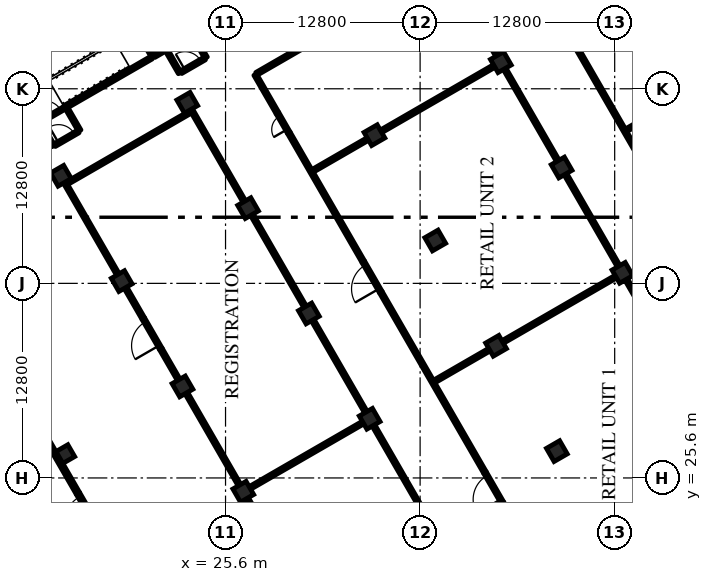
"""IFC4 building model, lengths in metres.
Left out: names, types, materials, properties, quantities, classifications, styles, units other than length and angle.
Written with IfcOpenShell. Run it as: python <this file> out.ifc"""

import sys

from ifc_helpers import new_model, si_unit, direction, frame, frame_2d, origin, origin_2d, place, context, subcontext, project, spatial, rectangle, extrude, element, fill, save


model = new_model("IFC4")
c1 = context("Model", 3, precision=1e-05, world=origin(), true_north=direction((0.0, 1.0)))
c2 = subcontext(c1, "Body", "Model", "MODEL_VIEW")
j1 = project(units=[si_unit("LENGTHUNIT", "METRE"), si_unit("PLANEANGLEUNIT", "RADIAN")], contexts=[c1])
p1 = place(None, origin())
s1 = spatial("IfcSite", under=j1, at=p1, CompositionType="ELEMENT")
p2 = place(p1, origin())
s2 = spatial("IfcBuilding", under=s1, at=p2, CompositionType="ELEMENT")
p3 = place(p2, origin())
s3 = spatial("IfcBuildingStorey", under=s2, at=p3, CompositionType="ELEMENT", Elevation=0.0)
for number, where, z_axis, x_axis in (
    (1, (47.396, 27.364, -0.3), (0.0, 0.0, 1.0), (-0.5, 0.866, 0.0)),
    (2, (26.768, 24.692, -0.3), (0.0, 0.0, 1.0), (-0.5, 0.866, 0.0)),
    (3, (35.082, 29.492, -0.3), (0.0, 0.0, 1.0), (-0.5, 0.866, 0.0)),
    (4, (43.396, 34.292, -0.3), (0.0, 0.0, 1.0), (-0.5, 0.866, 0.0)),
    (5, (51.71, 39.092, -0.3), (0.0, 0.0, 1.0), (-0.5, 0.866, 0.0)),
):
    element("IfcColumn", number, at=place(p3, frame(where, z_axis=z_axis, x_axis=x_axis)), inside=s3, PredefinedType="COLUMN", context=c2, shape_type="SweptSolid", body=[
        extrude(rectangle(XDim=1.0, YDim=1.0, at=origin_2d()), origin(), (0.0, 0.0, 1.0), 6.3),
    ])
p4 = place(p3, frame((15.061, 27.17, -0.3), z_axis=(0.0, 0.0, 1.0), x_axis=(-0.5, 0.866025403784, 0.0)))
e6 = element("IfcColumn", 6, at=p4, inside=s3, PredefinedType="COLUMN", context=c2, shape_type="SweptSolid", body=[
    extrude(rectangle(XDim=0.9, YDim=0.9, at=origin_2d()), origin(), (0.0, 0.0, 1.0), 6.3),
])
for number, where, z_axis, x_axis in (
    (7, (22.768, 31.62, -0.3), (0.0, 0.0, 1.0), (-0.5, 0.866, 0.0)),
    (8, (31.082, 36.42, -0.3), (0.0, 0.0, 1.0), (-0.5, 0.866, 0.0)),
    (9, (39.396, 41.22, -0.3), (0.0, 0.0, 1.0), (-0.5, 0.866, 0.0)),
    (10, (47.71, 46.021, -0.3), (0.0, 0.0, 1.0), (-0.5, 0.866, 0.0)),
    (11, (18.768, 38.549, -0.3), (0.0, 0.0, 1.0), (-0.5, 0.866, 0.0)),
    (12, (27.082, 43.349, -0.3), (0.0, 0.0, 1.0), (-0.5, 0.866, 0.0)),
    (13, (35.396, 48.149, -0.3), (0.0, 0.0, 1.0), (-0.5, 0.866, 0.0)),
    (14, (43.71, 52.948, -0.3), (0.0, 0.0, 1.0), (-0.5, 0.866, 0.0)),
    (15, (14.768, 45.477, -0.3), (0.0, 0.0, 1.0), (-0.5, 0.866, 0.0)),
    (16, (23.082, 50.277, -0.3), (0.0, 0.0, 1.0), (-0.5, 0.866, 0.0)),
):
    element("IfcColumn", number, at=place(p3, frame(where, z_axis=z_axis, x_axis=x_axis)), inside=s3, PredefinedType="COLUMN", context=c2, shape_type="SweptSolid", body=[
        extrude(rectangle(XDim=1.0, YDim=1.0, at=origin_2d()), origin(), (0.0, 0.0, 1.0), 6.3),
    ])
p5 = place(p3, frame((17.238, 22.25, 0.0), z_axis=(0.0, 0.0, 1.0), x_axis=(-0.499980770555, 0.866036505625, 0.0)))
e17 = element("IfcWall", 17, at=p5, inside=s3, PredefinedType="SOLIDWALL", context=c2, shape_type="SweptSolid", body=[
    extrude(rectangle(XDim=2.7, YDim=0.25, at=frame_2d((1.35, 0.0))), origin(), (0.0, 0.0, 1.0), 5.7),
])
p6 = place(p5, frame((0.25, 0.0, 0.0)))
e18 = element("IfcOpeningElement", 18, at=p6, cuts=e17, PredefinedType="OPENING", context=c2, shape_type="SweptSolid", body=[
    extrude(rectangle(XDim=2.2, YDim=2.1, at=frame_2d((1.1, 1.05))), frame((0.0, 0.135, 0.0), z_axis=(0.0, -1.0, 0.0), x_axis=(1.0, 0.0, 0.0)), (0.0, 0.0, 1.0), 0.27),
])
p7 = place(p3, frame((15.888, 24.588, 0.0), z_axis=(0.0, 0.0, 1.0), x_axis=(-0.50002983664, 0.866008176907, 0.0)))
e19 = element("IfcWall", 19, at=p7, inside=s3, PredefinedType="SOLIDWALL", context=c2, shape_type="SweptSolid", body=[
    extrude(rectangle(XDim=4.4, YDim=0.25, at=frame_2d((2.2, 0.0))), origin(), (0.0, 0.0, 1.0), 5.7),
])
p8 = place(p3, frame((47.49, 65.351, 0.0), z_axis=(0.0, 0.0, 1.0), x_axis=(0.499999548647, -0.866025664373, 0.0)))
e20 = element("IfcWall", 20, at=p8, inside=s3, PredefinedType="SOLIDWALL", context=c2, shape_type="SweptSolid", body=[
    extrude(rectangle(XDim=34.6, YDim=0.25, at=frame_2d((17.3, 0.0))), origin(), (0.0, 0.0, 1.0), 5.7),
])
p9 = place(p3, frame((12.909, 53.497, 0.0), z_axis=(0.0, 0.0, 1.0), x_axis=(0.866026575979, 0.499997969693, 0.0)))
e21 = element("IfcWall", 21, at=p9, inside=s3, PredefinedType="SOLIDWALL", context=c2, shape_type="SweptSolid", body=[
    extrude(rectangle(XDim=6.75, YDim=0.25, at=frame_2d((3.375, 0.0))), origin(), (0.0, 0.0, 1.0), 5.7),
])
p10 = place(p3, frame((20.817, 53.299, 0.0), z_axis=(0.0, 0.0, 1.0), x_axis=(-0.49999285859, 0.86602952684, 0.0)))
e22 = element("IfcWall", 22, at=p10, inside=s3, PredefinedType="SOLIDWALL", context=c2, shape_type="SweptSolid", body=[
    extrude(rectangle(XDim=3.1, YDim=0.2, at=frame_2d((1.55, 0.0))), origin(), (0.0, 0.0, 1.0), 5.7),
])
p11 = place(p3, frame((13.456, 49.049, 0.0), z_axis=(0.0, 0.0, 1.0), x_axis=(0.866036909293, 0.499980071345, 0.0)))
e23 = element("IfcWall", 23, at=p11, inside=s3, PredefinedType="SOLIDWALL", context=c2, shape_type="SweptSolid", body=[
    extrude(rectangle(XDim=1.75, YDim=0.2, at=frame_2d((0.875, 0.0))), origin(), (0.0, 0.0, 1.0), 5.7),
])
p12 = place(p11, frame((0.3, 0.0, 0.0)))
e24 = element("IfcOpeningElement", 24, at=p12, cuts=e23, PredefinedType="OPENING", context=c2, shape_type="SweptSolid", body=[
    extrude(rectangle(XDim=1.2, YDim=2.1, at=frame_2d((0.6, 1.05))), frame((0.0, 0.11, 0.0), z_axis=(0.0, -1.0, 0.0), x_axis=(1.0, 0.0, 0.0)), (0.0, 0.0, 1.0), 0.22),
])
p13 = place(p3, frame((14.972, 49.924, 0.0), z_axis=(0.0, 0.0, 1.0), x_axis=(0.86601134256, 0.500024353964, 0.0)))
e25 = element("IfcWall", 25, at=p13, inside=s3, PredefinedType="SOLIDWALL", context=c2, shape_type="SweptSolid", body=[
    extrude(rectangle(XDim=6.65, YDim=0.2, at=frame_2d((3.325, 0.0))), origin(), (0.0, 0.0, 1.0), 5.7),
])
for number, where, z_axis, x_axis in (
    (26, (14.27, 47.441, 0.0), (0.0, 0.0, 1.0), (-0.5, 0.866, 0.0)),
    (27, (16.001, 48.441, 0.0), (0.0, 0.0, 1.0), (-0.5, 0.866, 0.0)),
    (28, (22.583, 52.24, 0.0), (0.0, 0.0, 1.0), (-0.5, 0.866, 0.0)),
):
    element("IfcWall", number, at=place(p3, frame(where, z_axis=z_axis, x_axis=x_axis)), inside=s3, PredefinedType="PARTITIONING", context=c2, shape_type="SweptSolid", body=[
        extrude(rectangle(XDim=1.7, YDim=0.2, at=frame_2d((0.85, 0.0))), origin(), (0.0, 0.0, 1.0), 5.1),
    ])
p14 = place(p3, frame((24.315, 53.24, 0.0), z_axis=(0.0, 0.0, 1.0), x_axis=(-0.500000056704, 0.866025371046, 0.0)))
e29 = element("IfcWall", 29, at=p14, inside=s3, PredefinedType="PARTITIONING", context=c2, shape_type="SweptSolid", body=[
    extrude(rectangle(XDim=1.7, YDim=0.2, at=frame_2d((0.85, 0.0))), origin(), (0.0, 0.0, 1.0), 5.1),
])
p15 = place(p3, frame((14.356, 47.49, 0.0), z_axis=(0.0, 0.0, 1.0), x_axis=(0.865955154139, 0.50012165622, 0.0)))
e30 = element("IfcWall", 30, at=p15, inside=s3, PredefinedType="PARTITIONING", context=c2, shape_type="SweptSolid", body=[
    extrude(rectangle(XDim=1.8, YDim=0.2, at=frame_2d((0.9, 0.0))), origin(), (0.0, 0.0, 1.0), 5.1),
])
p16 = place(p15, frame((0.3, 0.0, 0.0)))
e31 = element("IfcOpeningElement", 31, at=p16, cuts=e30, PredefinedType="OPENING", context=c2, shape_type="SweptSolid", body=[
    extrude(rectangle(XDim=1.2, YDim=2.1, at=frame_2d((0.6, 1.05))), frame((0.0, 0.11, 0.0), z_axis=(0.0, -1.0, 0.0), x_axis=(1.0, 0.0, 0.0)), (0.0, 0.0, 1.0), 0.22),
])
p17 = place(p3, frame((22.67, 52.291, 0.0), z_axis=(0.0, 0.0, 1.0), x_axis=(0.865989075817, 0.500062916607, 0.0)))
e32 = element("IfcWall", 32, at=p17, inside=s3, PredefinedType="PARTITIONING", context=c2, shape_type="SweptSolid", body=[
    extrude(rectangle(XDim=1.8, YDim=0.2, at=frame_2d((0.9, 0.0))), origin(), (0.0, 0.0, 1.0), 5.1),
])
p18 = place(p17, frame((0.3, 0.0, 0.0)))
e33 = element("IfcOpeningElement", 33, at=p18, cuts=e32, PredefinedType="OPENING", context=c2, shape_type="SweptSolid", body=[
    extrude(rectangle(XDim=1.2, YDim=2.1, at=frame_2d((0.6, 1.05))), frame((0.0, 0.11, 0.0), z_axis=(0.0, -1.0, 0.0), x_axis=(1.0, 0.0, 0.0)), (0.0, 0.0, 1.0), 0.22),
])
for number, where, z_axis, x_axis in (
    (34, (30.518, 18.197, 0.0), (0.0, 0.0, 1.0), (-0.5, 0.866, 0.0)),
    (35, (26.518, 25.125, 0.0), (0.0, 0.0, 1.0), (-0.5, 0.866, 0.0)),
):
    element("IfcWall", number, at=place(p3, frame(where, z_axis=z_axis, x_axis=x_axis)), inside=s3, PredefinedType="PARTITIONING", context=c2, shape_type="SweptSolid", body=[
        extrude(rectangle(XDim=7.0, YDim=0.2, at=frame_2d((3.5, 0.0))), origin(), (0.0, 0.0, 1.0), 5.1),
    ])
p19 = place(p3, frame((22.518, 32.053, 0.0), z_axis=(0.0, 0.0, 1.0), x_axis=(-0.500016218704, 0.866016039709, 0.0)))
e36 = element("IfcWall", 36, at=p19, inside=s3, PredefinedType="PARTITIONING", context=c2, shape_type="SweptSolid", body=[
    extrude(rectangle(XDim=2.35, YDim=0.2, at=frame_2d((1.175, 0.0))), origin(), (0.0, 0.0, 1.0), 5.1),
])
p20 = place(p3, frame((21.343, 34.089, 0.0), z_axis=(0.0, 0.0, 1.0), x_axis=(-0.499952165731, 0.866053019151, 0.0)))
e37 = element("IfcWall", 37, at=p20, inside=s3, PredefinedType="PARTITIONING", context=c2, shape_type="SweptSolid", body=[
    extrude(rectangle(XDim=2.3, YDim=0.2, at=frame_2d((1.15, 0.0))), origin(), (0.0, 0.0, 1.0), 5.1),
])
p21 = place(p20, frame((0.25, 0.0, 0.0)))
e38 = element("IfcOpeningElement", 38, at=p21, cuts=e37, PredefinedType="OPENING", context=c2, shape_type="SweptSolid", body=[
    extrude(rectangle(XDim=1.8, YDim=2.1, at=frame_2d((0.9, 1.05))), frame((0.0, 0.11, 0.0), z_axis=(0.0, -1.0, 0.0), x_axis=(1.0, 0.0, 0.0)), (0.0, 0.0, 1.0), 0.22),
])
p22 = place(p3, frame((20.193, 36.081, 0.0), z_axis=(0.0, 0.0, 1.0), x_axis=(-0.500061208168, 0.865990062348, 0.0)))
e39 = element("IfcWall", 39, at=p22, inside=s3, PredefinedType="PARTITIONING", context=c2, shape_type="SweptSolid", body=[
    extrude(rectangle(XDim=2.35, YDim=0.2, at=frame_2d((1.175, 0.0))), origin(), (0.0, 0.0, 1.0), 5.1),
])
p23 = place(p3, frame((18.518, 38.982, 0.0), z_axis=(0.0, 0.0, 1.0), x_axis=(-0.500004234368, 0.866022959057, 0.0)))
e40 = element("IfcWall", 40, at=p23, inside=s3, PredefinedType="PARTITIONING", context=c2, shape_type="SweptSolid", body=[
    extrude(rectangle(XDim=6.875, YDim=0.2, at=frame_2d((3.438, 0.0))), origin(), (0.0, 0.0, 1.0), 5.1),
])
for number, where, z_axis, x_axis in (
    (41, (38.832, 22.997, 0.0), (0.0, 0.0, 1.0), (-0.5, 0.866, 0.0)),
    (42, (34.832, 29.925, 0.0), (0.0, 0.0, 1.0), (-0.5, 0.866, 0.0)),
    (43, (30.832, 36.854, 0.0), (0.0, 0.0, 1.0), (-0.5, 0.866, 0.0)),
):
    element("IfcWall", number, at=place(p3, frame(where, z_axis=z_axis, x_axis=x_axis)), inside=s3, PredefinedType="PARTITIONING", context=c2, shape_type="SweptSolid", body=[
        extrude(rectangle(XDim=7.0, YDim=0.2, at=frame_2d((3.5, 0.0))), origin(), (0.0, 0.0, 1.0), 5.1),
    ])
p24 = place(p3, frame((26.832, 43.781, 0.0), z_axis=(0.0, 0.0, 1.0), x_axis=(-0.499988857673, 0.866031836714, 0.0)))
e44 = element("IfcWall", 44, at=p24, inside=s3, PredefinedType="PARTITIONING", context=c2, shape_type="SweptSolid", body=[
    extrude(rectangle(XDim=6.875, YDim=0.2, at=frame_2d((3.438, 0.0))), origin(), (0.0, 0.0, 1.0), 5.1),
])
p25 = place(p3, frame((43.814, 23.968, 0.0), z_axis=(0.0, 0.0, 1.0), x_axis=(-0.500031774688, 0.866007057882, 0.0)))
e45 = element("IfcWall", 45, at=p25, inside=s3, PredefinedType="PARTITIONING", context=c2, shape_type="SweptSolid", body=[
    extrude(rectangle(XDim=2.3, YDim=0.2, at=frame_2d((1.15, 0.0))), origin(), (0.0, 0.0, 1.0), 5.1),
])
p26 = place(p25, frame((0.25, 0.0, 0.0)))
e46 = element("IfcOpeningElement", 46, at=p26, cuts=e45, PredefinedType="OPENING", context=c2, shape_type="SweptSolid", body=[
    extrude(rectangle(XDim=1.8, YDim=2.1, at=frame_2d((0.9, 1.05))), frame((0.0, 0.11, 0.0), z_axis=(0.0, -1.0, 0.0), x_axis=(1.0, 0.0, 0.0)), (0.0, 0.0, 1.0), 0.22),
])
p27 = place(p3, frame((42.664, 25.96, 0.0), z_axis=(0.0, 0.0, 1.0), x_axis=(-0.499993437113, 0.866029192836, 0.0)))
e47 = element("IfcWall", 47, at=p27, inside=s3, PredefinedType="PARTITIONING", context=c2, shape_type="SweptSolid", body=[
    extrude(rectangle(XDim=13.7, YDim=0.2, at=frame_2d((6.85, 0.0))), origin(), (0.0, 0.0, 1.0), 5.1),
])
p28 = place(p3, frame((35.814, 37.824, 0.0), z_axis=(0.0, 0.0, 1.0), x_axis=(-0.500031774688, 0.866007057882, 0.0)))
e48 = element("IfcWall", 48, at=p28, inside=s3, PredefinedType="PARTITIONING", context=c2, shape_type="SweptSolid", body=[
    extrude(rectangle(XDim=2.3, YDim=0.2, at=frame_2d((1.15, 0.0))), origin(), (0.0, 0.0, 1.0), 5.1),
])
p29 = place(p28, frame((0.25, 0.0, 0.0)))
e49 = element("IfcOpeningElement", 49, at=p29, cuts=e48, PredefinedType="OPENING", context=c2, shape_type="SweptSolid", body=[
    extrude(rectangle(XDim=1.8, YDim=2.1, at=frame_2d((0.9, 1.05))), frame((0.0, 0.11, 0.0), z_axis=(0.0, -1.0, 0.0), x_axis=(1.0, 0.0, 0.0)), (0.0, 0.0, 1.0), 0.22),
])
p30 = place(p3, frame((34.664, 39.816, 0.0), z_axis=(0.0, 0.0, 1.0), x_axis=(-0.49999201416, 0.866030014362, 0.0)))
e50 = element("IfcWall", 50, at=p30, inside=s3, PredefinedType="PARTITIONING", context=c2, shape_type="SweptSolid", body=[
    extrude(rectangle(XDim=9.8, YDim=0.2, at=frame_2d((4.9, 0.0))), origin(), (0.0, 0.0, 1.0), 5.1),
])
p31 = place(p3, frame((29.764, 48.303, 0.0), z_axis=(0.0, 0.0, 1.0), x_axis=(-0.500060622324, 0.86599040064, 0.0)))
e51 = element("IfcWall", 51, at=p31, inside=s3, PredefinedType="PARTITIONING", context=c2, shape_type="SweptSolid", body=[
    extrude(rectangle(XDim=1.5, YDim=0.2, at=frame_2d((0.75, 0.0))), origin(), (0.0, 0.0, 1.0), 5.1),
])
p32 = place(p31, frame((0.25, 0.0, 0.0)))
e52 = element("IfcOpeningElement", 52, at=p32, cuts=e51, PredefinedType="OPENING", context=c2, shape_type="SweptSolid", body=[
    extrude(rectangle(XDim=1.0, YDim=2.1, at=frame_2d((0.5, 1.05))), frame((0.0, 0.11, 0.0), z_axis=(0.0, -1.0, 0.0), x_axis=(1.0, 0.0, 0.0)), (0.0, 0.0, 1.0), 0.22),
])
p33 = place(p3, frame((29.014, 49.602, 0.0), z_axis=(0.0, 0.0, 1.0), x_axis=(-0.499963291492, 0.866046596414, 0.0)))
e53 = element("IfcWall", 53, at=p33, inside=s3, PredefinedType="PARTITIONING", context=c2, shape_type="SweptSolid", body=[
    extrude(rectangle(XDim=2.925, YDim=0.2, at=frame_2d((1.462, 0.0))), origin(), (0.0, 0.0, 1.0), 5.1),
])
for number, where, z_axis, x_axis in (
    (54, (55.46, 32.597, 0.0), (0.0, 0.0, 1.0), (-0.5, 0.866, 0.0)),
    (55, (51.46, 39.525, 0.0), (0.0, 0.0, 1.0), (-0.5, 0.866, 0.0)),
    (56, (47.46, 46.453, 0.0), (0.0, 0.0, 1.0), (-0.5, 0.866, 0.0)),
):
    element("IfcWall", number, at=place(p3, frame(where, z_axis=z_axis, x_axis=x_axis)), inside=s3, PredefinedType="PARTITIONING", context=c2, shape_type="SweptSolid", body=[
        extrude(rectangle(XDim=7.0, YDim=0.2, at=frame_2d((3.5, 0.0))), origin(), (0.0, 0.0, 1.0), 5.1),
    ])
p34 = place(p3, frame((43.46, 53.382, 0.0), z_axis=(0.0, 0.0, 1.0), x_axis=(-0.499988857673, 0.866031836714, 0.0)))
e57 = element("IfcWall", 57, at=p34, inside=s3, PredefinedType="PARTITIONING", context=c2, shape_type="SweptSolid", body=[
    extrude(rectangle(XDim=6.875, YDim=0.2, at=frame_2d((3.438, 0.0))), origin(), (0.0, 0.0, 1.0), 5.1),
])
p35 = place(p3, frame((55.442, 42.228, 0.0), z_axis=(0.0, 0.0, 1.0), x_axis=(-0.500004228592, 0.866022962392, 0.0)))
e58 = element("IfcWall", 58, at=p35, inside=s3, PredefinedType="PARTITIONING", context=c2, shape_type="SweptSolid", body=[
    extrude(rectangle(XDim=14.3, YDim=0.2, at=frame_2d((7.15, 0.0))), origin(), (0.0, 0.0, 1.0), 5.1),
])
for number, where, z_axis, x_axis in (
    (59, (51.829, 20.686, 0.0), (0.0, 0.0, 1.0), (0.866, 0.5, 0.0)),
    (60, (27.201, 24.942, 0.0), (0.0, 0.0, 1.0), (0.866, 0.5, 0.0)),
):
    element("IfcWall", number, at=place(p3, frame(where, z_axis=z_axis, x_axis=x_axis)), inside=s3, PredefinedType="PARTITIONING", context=c2, shape_type="SweptSolid", body=[
        extrude(rectangle(XDim=8.6, YDim=0.2, at=frame_2d((4.3, 0.0))), origin(), (0.0, 0.0, 1.0), 5.1),
    ])
p36 = place(p3, frame((39.325, 31.942, 0.0), z_axis=(0.0, 0.0, 1.0), x_axis=(0.866023935413, 0.500002543286, 0.0)))
e61 = element("IfcWall", 61, at=p36, inside=s3, PredefinedType="PARTITIONING", context=c2, shape_type="SweptSolid", body=[
    extrude(rectangle(XDim=4.2, YDim=0.2, at=frame_2d((2.1, 0.0))), origin(), (0.0, 0.0, 1.0), 5.1),
])
p37 = place(p3, frame((43.829, 34.542, 0.0), z_axis=(0.0, 0.0, 1.0), x_axis=(0.866021068297, 0.500007509209, 0.0)))
e62 = element("IfcWall", 62, at=p37, inside=s3, PredefinedType="PARTITIONING", context=c2, shape_type="SweptSolid", body=[
    extrude(rectangle(XDim=8.6, YDim=0.2, at=frame_2d((4.3, 0.0))), origin(), (0.0, 0.0, 1.0), 5.1),
])
p38 = place(p3, frame((51.953, 48.47, 0.0), z_axis=(0.0, 0.0, 1.0), x_axis=(0.8660424351, 0.499970499736, 0.0)))
e63 = element("IfcWall", 63, at=p38, inside=s3, PredefinedType="PARTITIONING", context=c2, shape_type="SweptSolid", body=[
    extrude(rectangle(XDim=3.55, YDim=0.2, at=frame_2d((1.775, 0.0))), origin(), (0.0, 0.0, 1.0), 5.1),
])
p39 = place(p3, frame((31.325, 45.799, 0.0), z_axis=(0.0, 0.0, 1.0), x_axis=(0.866023935413, 0.500002543286, 0.0)))
e64 = element("IfcWall", 64, at=p39, inside=s3, PredefinedType="PARTITIONING", context=c2, shape_type="SweptSolid", body=[
    extrude(rectangle(XDim=4.2, YDim=0.2, at=frame_2d((2.1, 0.0))), origin(), (0.0, 0.0, 1.0), 5.1),
])
p40 = place(p3, frame((35.829, 48.399, 0.0), z_axis=(0.0, 0.0, 1.0), x_axis=(0.866033360935, 0.499986217557, 0.0)))
e65 = element("IfcWall", 65, at=p40, inside=s3, PredefinedType="PARTITIONING", context=c2, shape_type="SweptSolid", body=[
    extrude(rectangle(XDim=8.6, YDim=0.2, at=frame_2d((4.3, 0.0))), origin(), (0.0, 0.0, 1.0), 5.1),
])
p41 = place(p3, frame((15.167, 44.986, 0.0), z_axis=(0.0, 0.0, 1.0), x_axis=(0.866027286158, 0.499996739618, 0.0)))
e66 = element("IfcWall", 66, at=p41, inside=s3, PredefinedType="PARTITIONING", context=c2, shape_type="SweptSolid", body=[
    extrude(rectangle(XDim=9.4, YDim=0.2, at=frame_2d((4.7, 0.0))), origin(), (0.0, 0.0, 1.0), 5.1),
])
p42 = place(p3, frame((27.638, 52.186, 0.0), z_axis=(0.0, 0.0, 1.0), x_axis=(0.866023247849, 0.500003734171, 0.0)))
e67 = element("IfcWall", 67, at=p42, inside=s3, PredefinedType="PARTITIONING", context=c2, shape_type="SweptSolid", body=[
    extrude(rectangle(XDim=14.2, YDim=0.2, at=frame_2d((7.1, 0.0))), origin(), (0.0, 0.0, 1.0), 5.1),
])
p43 = place(p3, frame((20.904, 53.349, 0.0), z_axis=(0.0, 0.0, 1.0), x_axis=(0.865961984968, 0.500109828528, 0.0)))
e68 = element("IfcWall", 68, at=p43, inside=s3, PredefinedType="PARTITIONING", context=c2, shape_type="SweptSolid", body=[
    extrude(rectangle(XDim=0.8, YDim=0.2, at=frame_2d((0.4, 0.0))), origin(), (0.0, 0.0, 1.0), 5.1),
])
p44 = place(p6, origin())
e69 = element("IfcDoor", 69, at=p44, inside=s3, OperationType="DOUBLE_DOOR_SINGLE_SWING", PredefinedType="DOOR", context=c2, shape_type="SweptSolid", body=[
    extrude(rectangle(XDim=2.2, YDim=2.1, at=frame_2d((1.1, 1.05))), frame((0.0, 0.025, 0.0), z_axis=(0.0, -1.0, 0.0), x_axis=(1.0, 0.0, 0.0)), (0.0, 0.0, 1.0), 0.05),
])
fill(e18, e69)
p45 = place(p12, origin())
e70 = element("IfcDoor", 70, at=p45, inside=s3, OperationType="SINGLE_SWING_LEFT", PredefinedType="DOOR", context=c2, shape_type="SweptSolid", body=[
    extrude(rectangle(XDim=1.2, YDim=2.1, at=frame_2d((0.6, 1.05))), frame((0.0, 0.025, 0.0), z_axis=(0.0, -1.0, 0.0), x_axis=(1.0, 0.0, 0.0)), (0.0, 0.0, 1.0), 0.05),
])
fill(e24, e70)
p46 = place(p16, origin())
e71 = element("IfcDoor", 71, at=p46, inside=s3, OperationType="SINGLE_SWING_LEFT", PredefinedType="DOOR", context=c2, shape_type="SweptSolid", body=[
    extrude(rectangle(XDim=1.2, YDim=2.1, at=frame_2d((0.6, 1.05))), frame((0.0, 0.025, 0.0), z_axis=(0.0, -1.0, 0.0), x_axis=(1.0, 0.0, 0.0)), (0.0, 0.0, 1.0), 0.05),
])
fill(e31, e71)
p47 = place(p18, origin())
e72 = element("IfcDoor", 72, at=p47, inside=s3, OperationType="SINGLE_SWING_LEFT", PredefinedType="DOOR", context=c2, shape_type="SweptSolid", body=[
    extrude(rectangle(XDim=1.2, YDim=2.1, at=frame_2d((0.6, 1.05))), frame((0.0, 0.025, 0.0), z_axis=(0.0, -1.0, 0.0), x_axis=(1.0, 0.0, 0.0)), (0.0, 0.0, 1.0), 0.05),
])
fill(e33, e72)
p48 = place(p21, origin())
e73 = element("IfcDoor", 73, at=p48, inside=s3, OperationType="DOUBLE_DOOR_SINGLE_SWING", PredefinedType="DOOR", context=c2, shape_type="SweptSolid", body=[
    extrude(rectangle(XDim=1.8, YDim=2.1, at=frame_2d((0.9, 1.05))), frame((0.0, 0.025, 0.0), z_axis=(0.0, -1.0, 0.0), x_axis=(1.0, 0.0, 0.0)), (0.0, 0.0, 1.0), 0.05),
])
fill(e38, e73)
p49 = place(p26, origin())
e74 = element("IfcDoor", 74, at=p49, inside=s3, OperationType="DOUBLE_DOOR_SINGLE_SWING", PredefinedType="DOOR", context=c2, shape_type="SweptSolid", body=[
    extrude(rectangle(XDim=1.8, YDim=2.1, at=frame_2d((0.9, 1.05))), frame((0.0, 0.025, 0.0), z_axis=(0.0, -1.0, 0.0), x_axis=(1.0, 0.0, 0.0)), (0.0, 0.0, 1.0), 0.05),
])
fill(e46, e74)
p50 = place(p29, origin())
e75 = element("IfcDoor", 75, at=p50, inside=s3, OperationType="DOUBLE_DOOR_SINGLE_SWING", PredefinedType="DOOR", context=c2, shape_type="SweptSolid", body=[
    extrude(rectangle(XDim=1.8, YDim=2.1, at=frame_2d((0.9, 1.05))), frame((0.0, 0.025, 0.0), z_axis=(0.0, -1.0, 0.0), x_axis=(1.0, 0.0, 0.0)), (0.0, 0.0, 1.0), 0.05),
])
fill(e49, e75)
p51 = place(p32, origin())
e76 = element("IfcDoor", 76, at=p51, inside=s3, OperationType="SINGLE_SWING_LEFT", PredefinedType="DOOR", context=c2, shape_type="SweptSolid", body=[
    extrude(rectangle(XDim=1.0, YDim=2.1, at=frame_2d((0.5, 1.05))), frame((0.0, 0.025, 0.0), z_axis=(0.0, -1.0, 0.0), x_axis=(1.0, 0.0, 0.0)), (0.0, 0.0, 1.0), 0.05),
])
fill(e52, e76)
save(model, sys.argv[1])
